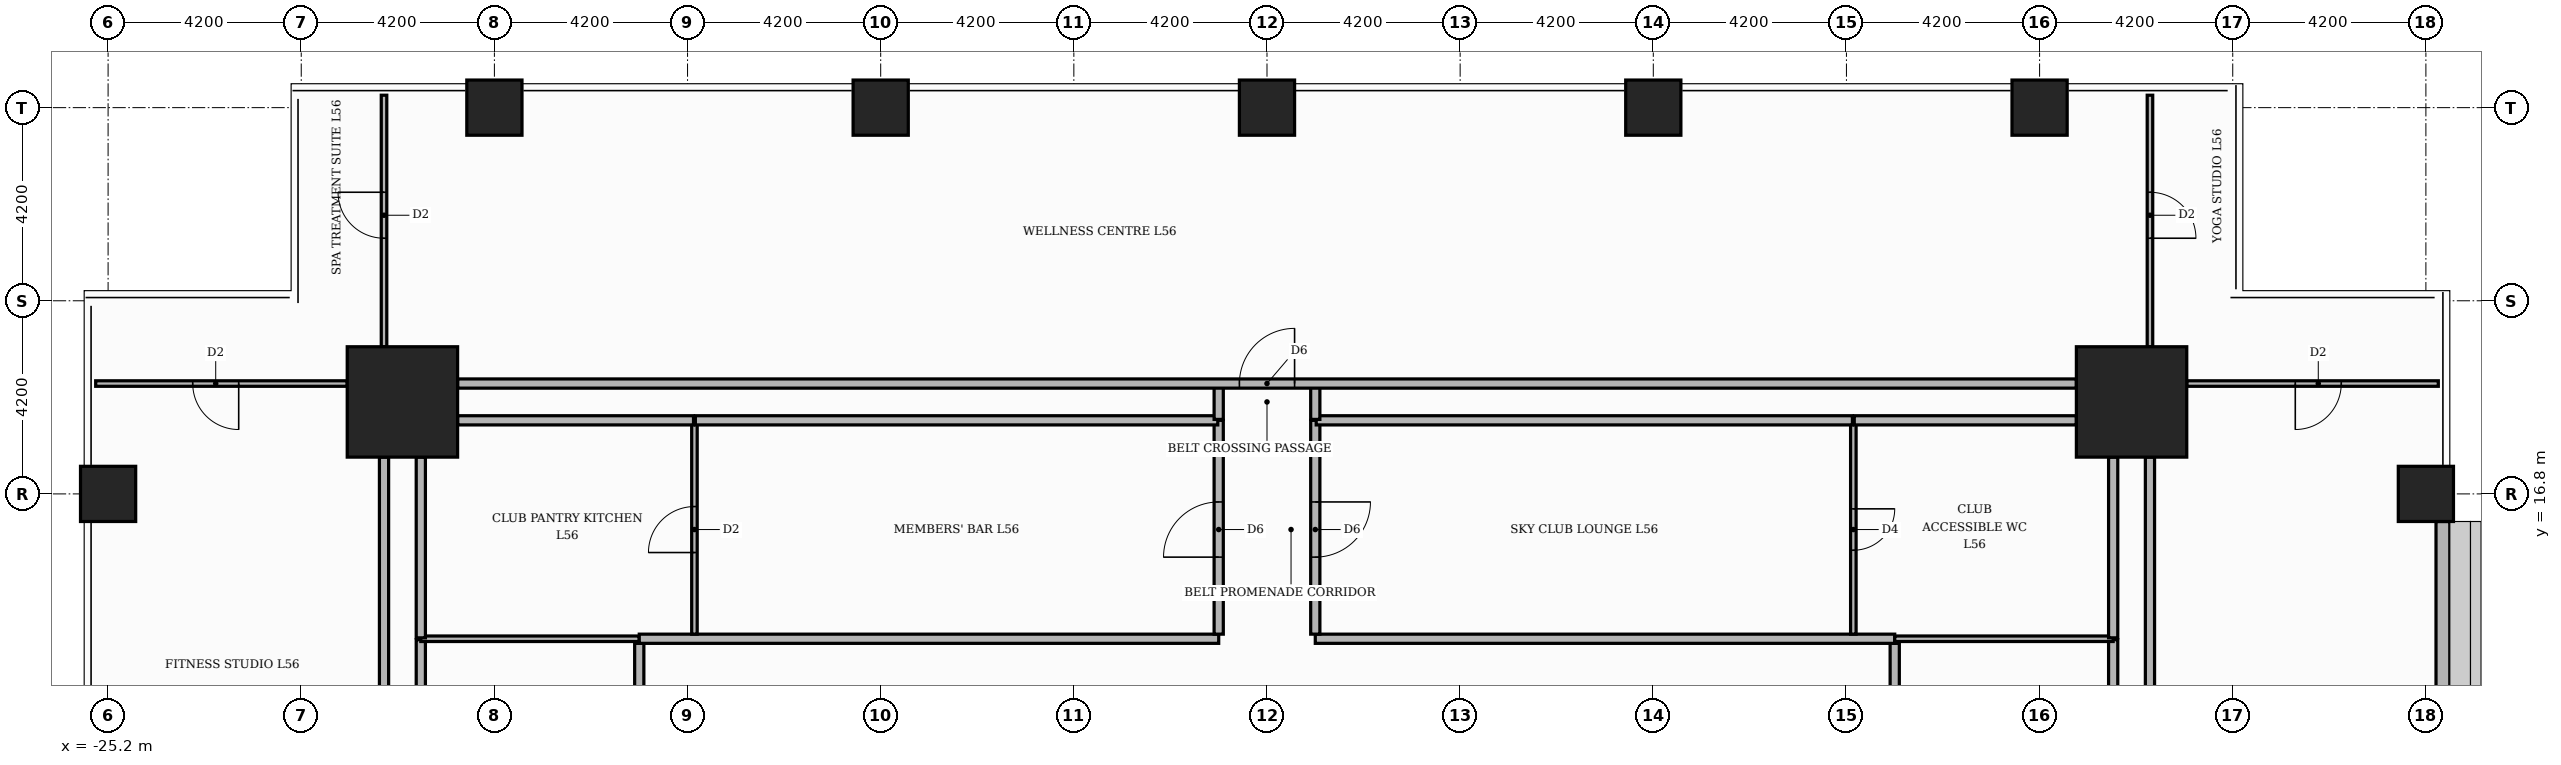
"""IFC4 building model, lengths in metres.
Left out: names, types, materials, properties, quantities, classifications, styles, units other than length and angle.
Written with IfcOpenShell. Run it as: python <this file> out.ifc"""

import sys

from ifc_helpers import new_model, si_unit, direction, frame, frame_2d, origin, origin_2d, place, context, subcontext, project, spatial, rectangle, extrude, element, fill, save


model = new_model("IFC4")
c1 = context("Model", 3, precision=1e-05, world=origin(), true_north=direction((0.0, 1.0)))
c2 = subcontext(c1, "Body", "Model", "MODEL_VIEW")
j1 = project(units=[si_unit("LENGTHUNIT", "METRE"), si_unit("PLANEANGLEUNIT", "RADIAN")], contexts=[c1])
p1 = place(None, origin())
s1 = spatial("IfcSite", under=j1, at=p1, CompositionType="ELEMENT")
p2 = place(p1, origin())
s2 = spatial("IfcBuilding", under=s1, at=p2, CompositionType="ELEMENT")
p3 = place(p2, frame((0.0, 0.0, 235.2)))
s3 = spatial("IfcBuildingStorey", under=s2, at=p3, CompositionType="ELEMENT", Elevation=235.2)
for number, where, z_axis, x_axis in (
    (1, (18.8, 18.8, 0.0), (0.0, 0.0, 1.0), (1.0, 0.0, 0.0)),
    (2, (-18.8, 18.8, 0.0), (0.0, 0.0, 1.0), (1.0, 0.0, 0.0)),
):
    element("IfcColumn", number, at=place(p3, frame(where, z_axis=z_axis, x_axis=x_axis)), inside=s3, PredefinedType="COLUMN", context=c2, shape_type="SweptSolid", body=[
        extrude(rectangle(XDim=2.4, YDim=2.4, at=origin_2d()), origin(), (0.0, 0.0, 1.0), 5.4),
    ])
for number, where, z_axis, x_axis in (
    (3, (25.2, 16.8, 0.0), (0.0, 0.0, 1.0), (1.0, 0.0, 0.0)),
    (4, (0.0, 25.2, 0.0), (0.0, 0.0, 1.0), (1.0, 0.0, 0.0)),
    (5, (-8.4, 25.2, 0.0), (0.0, 0.0, 1.0), (1.0, 0.0, 0.0)),
    (6, (-16.8, 25.2, 0.0), (0.0, 0.0, 1.0), (1.0, 0.0, 0.0)),
    (7, (8.4, 25.2, 0.0), (0.0, 0.0, 1.0), (1.0, 0.0, 0.0)),
    (8, (16.8, 25.2, 0.0), (0.0, 0.0, 1.0), (1.0, 0.0, 0.0)),
    (9, (-25.2, 16.8, 0.0), (0.0, 0.0, 1.0), (1.0, 0.0, 0.0)),
):
    element("IfcColumn", number, at=place(p3, frame(where, z_axis=z_axis, x_axis=x_axis)), inside=s3, PredefinedType="COLUMN", context=c2, shape_type="SweptSolid", body=[
        extrude(rectangle(XDim=1.2, YDim=1.2, at=origin_2d()), origin(), (0.0, 0.0, 1.0), 5.4),
    ])
p4 = place(p3, frame((25.57, -16.2, 0.0), z_axis=(0.0, 0.0, 1.0), x_axis=(0.0, 1.0, 0.0)))
e10 = element("IfcWall", 10, at=p4, inside=s3, PredefinedType="STANDARD", context=c2, shape_type="SweptSolid", body=[
    extrude(rectangle(XDim=32.4, YDim=0.3, at=frame_2d((16.2, 0.0))), origin(), (0.0, 0.0, 1.0), 4.98),
])
p5 = place(p3, frame((-19.2, -17.6, 0.0), z_axis=(0.0, 0.0, 1.0), x_axis=(0.0, 1.0, 0.0)))
e11 = element("IfcWall", 11, at=p5, inside=s3, PredefinedType="PARTITIONING", context=c2, shape_type="SweptSolid", body=[
    extrude(rectangle(XDim=35.2, YDim=0.2, at=frame_2d((17.6, 0.0))), origin(), (0.0, 0.0, 1.0), 4.98),
])
p6 = place(p3, frame((18.4, -17.6, 0.0), z_axis=(0.0, 0.0, 1.0), x_axis=(0.0, 1.0, 0.0)))
e12 = element("IfcWall", 12, at=p6, inside=s3, PredefinedType="PARTITIONING", context=c2, shape_type="SweptSolid", body=[
    extrude(rectangle(XDim=31.23, YDim=0.2, at=frame_2d((15.615, 0.0))), origin(), (0.0, 0.0, 1.0), 4.98),
])
p7 = place(p3, frame((-13.65, -13.55, 0.0), z_axis=(0.0, 0.0, 1.0), x_axis=(0.0, 1.0, 0.0)))
e13 = element("IfcWall", 13, at=p7, inside=s3, PredefinedType="PARTITIONING", context=c2, shape_type="SweptSolid", body=[
    extrude(rectangle(XDim=27.1, YDim=0.2, at=frame_2d((13.55, 0.0))), origin(), (0.0, 0.0, 1.0), 4.98),
])
p8 = place(p7, frame((20.375, 0.0, 0.0)))
e14 = element("IfcOpeningElement", 14, at=p8, cuts=e13, PredefinedType="OPENING", context=c2, shape_type="SweptSolid", body=[
    extrude(rectangle(XDim=1.2, YDim=2.1, at=frame_2d((0.6, 1.05))), frame((0.0, 0.11, 0.0), z_axis=(0.0, -1.0, 0.0), x_axis=(1.0, 0.0, 0.0)), (0.0, 0.0, 1.0), 0.22),
])
p9 = place(p3, frame((13.65, -13.55, 0.0), z_axis=(0.0, 0.0, 1.0), x_axis=(0.0, 1.0, 0.0)))
e15 = element("IfcWall", 15, at=p9, inside=s3, PredefinedType="PARTITIONING", context=c2, shape_type="SweptSolid", body=[
    extrude(rectangle(XDim=27.1, YDim=0.2, at=frame_2d((13.55, 0.0))), origin(), (0.0, 0.0, 1.0), 4.98),
])
p10 = place(p3, frame((-18.4, 1.22, 0.0), z_axis=(0.0, 0.0, 1.0), x_axis=(0.0, 1.0, 0.0)))
e16 = element("IfcWall", 16, at=p10, inside=s3, PredefinedType="PARTITIONING", context=c2, shape_type="SweptSolid", body=[
    extrude(rectangle(XDim=12.41, YDim=0.2, at=frame_2d((6.205, 0.0))), origin(), (0.0, 0.0, 1.0), 4.98),
])
p11 = place(p3, frame((19.2, 4.22, 0.0), z_axis=(0.0, 0.0, 1.0), x_axis=(0.0, 1.0, 0.0)))
e17 = element("IfcWall", 17, at=p11, inside=s3, PredefinedType="PARTITIONING", context=c2, shape_type="SweptSolid", body=[
    extrude(rectangle(XDim=13.38, YDim=0.2, at=frame_2d((6.69, 0.0))), origin(), (0.0, 0.0, 1.0), 4.98),
])
p12 = place(p3, frame((-18.4, 13.65, 0.0), z_axis=(0.0, 0.0, 1.0), x_axis=(1.0, 0.0, 0.0)))
e18 = element("IfcWall", 18, at=p12, inside=s3, PredefinedType="PARTITIONING", context=c2, shape_type="SweptSolid", body=[
    extrude(rectangle(XDim=4.75, YDim=0.12, at=frame_2d((2.375, 0.0))), origin(), (0.0, 0.0, 1.0), 4.98),
])
for number, where, z_axis, x_axis in (
    (19, (-13.65, 13.65, 0.0), (0.0, 0.0, 1.0), (1.0, 0.0, 0.0)),
    (20, (1.05, 13.65, 0.0), (0.0, 0.0, 1.0), (1.0, 0.0, 0.0)),
):
    element("IfcWall", number, at=place(p3, frame(where, z_axis=z_axis, x_axis=x_axis)), inside=s3, PredefinedType="PARTITIONING", context=c2, shape_type="SweptSolid", body=[
        extrude(rectangle(XDim=12.6, YDim=0.2, at=frame_2d((6.3, 0.0))), origin(), (0.0, 0.0, 1.0), 4.98),
    ])
p13 = place(p3, frame((13.65, 13.65, 0.0), z_axis=(0.0, 0.0, 1.0), x_axis=(1.0, 0.0, 0.0)))
e21 = element("IfcWall", 21, at=p13, inside=s3, PredefinedType="PARTITIONING", context=c2, shape_type="SweptSolid", body=[
    extrude(rectangle(XDim=4.75, YDim=0.12, at=frame_2d((2.375, 0.0))), origin(), (0.0, 0.0, 1.0), 4.98),
])
for number, where, z_axis, x_axis in (
    (22, (-18.4, 13.67, 0.0), (0.0, 0.0, 1.0), (0.0, 1.0, 0.0)),
    (23, (18.4, 13.67, 0.0), (0.0, 0.0, 1.0), (0.0, 1.0, 0.0)),
):
    element("IfcWall", number, at=place(p3, frame(where, z_axis=z_axis, x_axis=x_axis)), inside=s3, PredefinedType="PARTITIONING", context=c2, shape_type="SweptSolid", body=[
        extrude(rectangle(XDim=3.93, YDim=0.2, at=frame_2d((1.965, 0.0))), origin(), (0.0, 0.0, 1.0), 4.98),
    ])
p14 = place(p3, frame((-12.45, 13.75, 0.0), z_axis=(0.0, 0.0, 1.0), x_axis=(0.0, 1.0, 0.0)))
e24 = element("IfcWall", 24, at=p14, inside=s3, PredefinedType="PARTITIONING", context=c2, shape_type="SweptSolid", body=[
    extrude(rectangle(XDim=4.65, YDim=0.12, at=frame_2d((2.325, 0.0))), origin(), (0.0, 0.0, 1.0), 4.98),
])
p15 = place(p14, frame((1.775, 0.0, 0.0)))
e25 = element("IfcOpeningElement", 25, at=p15, cuts=e24, PredefinedType="OPENING", context=c2, shape_type="SweptSolid", body=[
    extrude(rectangle(XDim=1.0, YDim=2.1, at=frame_2d((0.5, 1.05))), frame((0.0, 0.07, 0.0), z_axis=(0.0, -1.0, 0.0), x_axis=(1.0, 0.0, 0.0)), (0.0, 0.0, 1.0), 0.14),
])
p16 = place(p3, frame((-1.05, 13.75, 0.0), z_axis=(0.0, 0.0, 1.0), x_axis=(0.0, 1.0, 0.0)))
e26 = element("IfcWall", 26, at=p16, inside=s3, PredefinedType="PARTITIONING", context=c2, shape_type="SweptSolid", body=[
    extrude(rectangle(XDim=4.65, YDim=0.2, at=frame_2d((2.325, 0.0))), origin(), (0.0, 0.0, 1.0), 4.98),
])
p17 = place(p16, frame((1.675, 0.0, 0.0)))
e27 = element("IfcOpeningElement", 27, at=p17, cuts=e26, PredefinedType="OPENING", context=c2, shape_type="SweptSolid", body=[
    extrude(rectangle(XDim=1.2, YDim=2.1, at=frame_2d((0.6, 1.05))), frame((0.0, 0.11, 0.0), z_axis=(0.0, -1.0, 0.0), x_axis=(1.0, 0.0, 0.0)), (0.0, 0.0, 1.0), 0.22),
])
p18 = place(p3, frame((1.05, 13.75, 0.0), z_axis=(0.0, 0.0, 1.0), x_axis=(0.0, 1.0, 0.0)))
e28 = element("IfcWall", 28, at=p18, inside=s3, PredefinedType="PARTITIONING", context=c2, shape_type="SweptSolid", body=[
    extrude(rectangle(XDim=4.65, YDim=0.2, at=frame_2d((2.325, 0.0))), origin(), (0.0, 0.0, 1.0), 4.98),
])
p19 = place(p18, frame((1.675, 0.0, 0.0)))
e29 = element("IfcOpeningElement", 29, at=p19, cuts=e28, PredefinedType="OPENING", context=c2, shape_type="SweptSolid", body=[
    extrude(rectangle(XDim=1.2, YDim=2.1, at=frame_2d((0.6, 1.05))), frame((0.0, 0.11, 0.0), z_axis=(0.0, -1.0, 0.0), x_axis=(1.0, 0.0, 0.0)), (0.0, 0.0, 1.0), 0.22),
])
p20 = place(p3, frame((12.75, 13.75, 0.0), z_axis=(0.0, 0.0, 1.0), x_axis=(0.0, 1.0, 0.0)))
e30 = element("IfcWall", 30, at=p20, inside=s3, PredefinedType="PARTITIONING", context=c2, shape_type="SweptSolid", body=[
    extrude(rectangle(XDim=4.65, YDim=0.12, at=frame_2d((2.325, 0.0))), origin(), (0.0, 0.0, 1.0), 4.98),
])
p21 = place(p20, frame((1.825, 0.0, 0.0)))
e31 = element("IfcOpeningElement", 31, at=p21, cuts=e30, PredefinedType="OPENING", context=c2, shape_type="SweptSolid", body=[
    extrude(rectangle(XDim=0.9, YDim=2.1, at=frame_2d((0.45, 1.05))), frame((0.0, 0.07, 0.0), z_axis=(0.0, -1.0, 0.0), x_axis=(1.0, 0.0, 0.0)), (0.0, 0.0, 1.0), 0.14),
])
p22 = place(p3, frame((-17.6, 18.4, 0.0), z_axis=(0.0, 0.0, 1.0), x_axis=(1.0, 0.0, 0.0)))
e32 = element("IfcWall", 32, at=p22, inside=s3, PredefinedType="PARTITIONING", context=c2, shape_type="SweptSolid", body=[
    extrude(rectangle(XDim=5.13, YDim=0.2, at=frame_2d((2.565, 0.0))), origin(), (0.0, 0.0, 1.0), 4.98),
])
p23 = place(p3, frame((-12.43, 18.4, 0.0), z_axis=(0.0, 0.0, 1.0), x_axis=(1.0, 0.0, 0.0)))
e33 = element("IfcWall", 33, at=p23, inside=s3, PredefinedType="PARTITIONING", context=c2, shape_type="SweptSolid", body=[
    extrude(rectangle(XDim=11.36, YDim=0.2, at=frame_2d((5.68, 0.0))), origin(), (0.0, 0.0, 1.0), 4.98),
])
p24 = place(p3, frame((1.07, 18.4, 0.0), z_axis=(0.0, 0.0, 1.0), x_axis=(1.0, 0.0, 0.0)))
e34 = element("IfcWall", 34, at=p24, inside=s3, PredefinedType="PARTITIONING", context=c2, shape_type="SweptSolid", body=[
    extrude(rectangle(XDim=11.66, YDim=0.2, at=frame_2d((5.83, 0.0))), origin(), (0.0, 0.0, 1.0), 4.98),
])
p25 = place(p3, frame((12.77, 18.4, 0.0), z_axis=(0.0, 0.0, 1.0), x_axis=(1.0, 0.0, 0.0)))
e35 = element("IfcWall", 35, at=p25, inside=s3, PredefinedType="PARTITIONING", context=c2, shape_type="SweptSolid", body=[
    extrude(rectangle(XDim=4.83, YDim=0.2, at=frame_2d((2.415, 0.0))), origin(), (0.0, 0.0, 1.0), 4.98),
])
for number, where, z_axis, x_axis in (
    (36, (-1.05, 18.42, 0.0), (0.0, 0.0, 1.0), (0.0, 1.0, 0.0)),
    (37, (1.05, 18.42, 0.0), (0.0, 0.0, 1.0), (0.0, 1.0, 0.0)),
):
    element("IfcWall", number, at=place(p3, frame(where, z_axis=z_axis, x_axis=x_axis)), inside=s3, PredefinedType="PARTITIONING", context=c2, shape_type="SweptSolid", body=[
        extrude(rectangle(XDim=0.76, YDim=0.2, at=frame_2d((0.38, 0.0))), origin(), (0.0, 0.0, 1.0), 4.98),
    ])
p26 = place(p3, frame((-25.47, 19.2, 0.0), z_axis=(0.0, 0.0, 1.0), x_axis=(1.0, 0.0, 0.0)))
e38 = element("IfcWall", 38, at=p26, inside=s3, PredefinedType="PARTITIONING", context=c2, shape_type="SweptSolid", body=[
    extrude(rectangle(XDim=5.47, YDim=0.12, at=frame_2d((2.735, 0.0))), origin(), (0.0, 0.0, 1.0), 4.98),
])
p27 = place(p26, frame((2.11, 0.0, 0.0)))
e39 = element("IfcOpeningElement", 39, at=p27, cuts=e38, PredefinedType="OPENING", context=c2, shape_type="SweptSolid", body=[
    extrude(rectangle(XDim=1.0, YDim=2.1, at=frame_2d((0.5, 1.05))), frame((0.0, 0.07, 0.0), z_axis=(0.0, -1.0, 0.0), x_axis=(1.0, 0.0, 0.0)), (0.0, 0.0, 1.0), 0.14),
])
p28 = place(p3, frame((-17.6, 19.2, 0.0), z_axis=(0.0, 0.0, 1.0), x_axis=(1.0, 0.0, 0.0)))
e40 = element("IfcWall", 40, at=p28, inside=s3, PredefinedType="PARTITIONING", context=c2, shape_type="SweptSolid", body=[
    extrude(rectangle(XDim=35.2, YDim=0.2, at=frame_2d((17.6, 0.0))), origin(), (0.0, 0.0, 1.0), 4.98),
])
p29 = place(p28, frame((17.0, 0.0, 0.0)))
e41 = element("IfcOpeningElement", 41, at=p29, cuts=e40, PredefinedType="OPENING", context=c2, shape_type="SweptSolid", body=[
    extrude(rectangle(XDim=1.2, YDim=2.1, at=frame_2d((0.6, 1.05))), frame((0.0, 0.11, 0.0), z_axis=(0.0, -1.0, 0.0), x_axis=(1.0, 0.0, 0.0)), (0.0, 0.0, 1.0), 0.22),
])
p30 = place(p3, frame((20.0, 19.2, 0.0), z_axis=(0.0, 0.0, 1.0), x_axis=(1.0, 0.0, 0.0)))
e42 = element("IfcWall", 42, at=p30, inside=s3, PredefinedType="PARTITIONING", context=c2, shape_type="SweptSolid", body=[
    extrude(rectangle(XDim=5.47, YDim=0.12, at=frame_2d((2.735, 0.0))), origin(), (0.0, 0.0, 1.0), 4.98),
])
p31 = place(p30, frame((2.36, 0.0, 0.0)))
e43 = element("IfcOpeningElement", 43, at=p31, cuts=e42, PredefinedType="OPENING", context=c2, shape_type="SweptSolid", body=[
    extrude(rectangle(XDim=1.0, YDim=2.1, at=frame_2d((0.5, 1.05))), frame((0.0, 0.07, 0.0), z_axis=(0.0, -1.0, 0.0), x_axis=(1.0, 0.0, 0.0)), (0.0, 0.0, 1.0), 0.14),
])
p32 = place(p3, frame((-19.2, 20.0, 0.0), z_axis=(0.0, 0.0, 1.0), x_axis=(0.0, 1.0, 0.0)))
e44 = element("IfcWall", 44, at=p32, inside=s3, PredefinedType="PARTITIONING", context=c2, shape_type="SweptSolid", body=[
    extrude(rectangle(XDim=5.47, YDim=0.12, at=frame_2d((2.735, 0.0))), origin(), (0.0, 0.0, 1.0), 4.98),
])
p33 = place(p32, frame((2.36, 0.0, 0.0)))
e45 = element("IfcOpeningElement", 45, at=p33, cuts=e44, PredefinedType="OPENING", context=c2, shape_type="SweptSolid", body=[
    extrude(rectangle(XDim=1.0, YDim=2.1, at=frame_2d((0.5, 1.05))), frame((0.0, 0.07, 0.0), z_axis=(0.0, -1.0, 0.0), x_axis=(1.0, 0.0, 0.0)), (0.0, 0.0, 1.0), 0.14),
])
p34 = place(p3, frame((19.2, 20.0, 0.0), z_axis=(0.0, 0.0, 1.0), x_axis=(0.0, 1.0, 0.0)))
e46 = element("IfcWall", 46, at=p34, inside=s3, PredefinedType="PARTITIONING", context=c2, shape_type="SweptSolid", body=[
    extrude(rectangle(XDim=5.47, YDim=0.12, at=frame_2d((2.735, 0.0))), origin(), (0.0, 0.0, 1.0), 4.98),
])
p35 = place(p34, frame((2.36, 0.0, 0.0)))
e47 = element("IfcOpeningElement", 47, at=p35, cuts=e46, PredefinedType="OPENING", context=c2, shape_type="SweptSolid", body=[
    extrude(rectangle(XDim=1.0, YDim=2.1, at=frame_2d((0.5, 1.05))), frame((0.0, 0.07, 0.0), z_axis=(0.0, -1.0, 0.0), x_axis=(1.0, 0.0, 0.0)), (0.0, 0.0, 1.0), 0.14),
])
p36 = place(p19, frame((1.2, 0.0, 0.0), z_axis=(0.0, 0.0, 1.0), x_axis=(-1.0, 0.0, 0.0)))
e48 = element("IfcDoor", 48, at=p36, inside=s3, OperationType="SINGLE_SWING_RIGHT", PredefinedType="DOOR", context=c2, shape_type="SweptSolid", body=[
    extrude(rectangle(XDim=1.2, YDim=2.1, at=frame_2d((0.6, 1.05))), frame((0.0, 0.025, 0.0), z_axis=(0.0, -1.0, 0.0), x_axis=(1.0, 0.0, 0.0)), (0.0, 0.0, 1.0), 0.05),
])
fill(e29, e48)
p37 = place(p17, origin())
e49 = element("IfcDoor", 49, at=p37, inside=s3, OperationType="SINGLE_SWING_LEFT", PredefinedType="DOOR", context=c2, shape_type="SweptSolid", body=[
    extrude(rectangle(XDim=1.2, YDim=2.1, at=frame_2d((0.6, 1.05))), frame((0.0, 0.025, 0.0), z_axis=(0.0, -1.0, 0.0), x_axis=(1.0, 0.0, 0.0)), (0.0, 0.0, 1.0), 0.05),
])
fill(e27, e49)
p38 = place(p15, origin())
e50 = element("IfcDoor", 50, at=p38, inside=s3, OperationType="SINGLE_SWING_LEFT", PredefinedType="DOOR", context=c2, shape_type="SweptSolid", body=[
    extrude(rectangle(XDim=1.0, YDim=2.1, at=frame_2d((0.5, 1.05))), frame((0.0, 0.025, 0.0), z_axis=(0.0, -1.0, 0.0), x_axis=(1.0, 0.0, 0.0)), (0.0, 0.0, 1.0), 0.05),
])
fill(e25, e50)
p39 = place(p21, frame((0.9, 0.0, 0.0), z_axis=(0.0, 0.0, 1.0), x_axis=(-1.0, 0.0, 0.0)))
e51 = element("IfcDoor", 51, at=p39, inside=s3, OperationType="SINGLE_SWING_RIGHT", PredefinedType="DOOR", context=c2, shape_type="SweptSolid", body=[
    extrude(rectangle(XDim=0.9, YDim=2.1, at=frame_2d((0.45, 1.05))), frame((0.0, 0.025, 0.0), z_axis=(0.0, -1.0, 0.0), x_axis=(1.0, 0.0, 0.0)), (0.0, 0.0, 1.0), 0.05),
])
fill(e31, e51)
p40 = place(p29, origin())
e52 = element("IfcDoor", 52, at=p40, inside=s3, OperationType="SINGLE_SWING_RIGHT", PredefinedType="DOOR", context=c2, shape_type="SweptSolid", body=[
    extrude(rectangle(XDim=1.2, YDim=2.1, at=frame_2d((0.6, 1.05))), frame((0.0, 0.025, 0.0), z_axis=(0.0, -1.0, 0.0), x_axis=(1.0, 0.0, 0.0)), (0.0, 0.0, 1.0), 0.05),
])
fill(e41, e52)
p41 = place(p33, origin())
e53 = element("IfcDoor", 53, at=p41, inside=s3, OperationType="SINGLE_SWING_RIGHT", PredefinedType="DOOR", context=c2, shape_type="SweptSolid", body=[
    extrude(rectangle(XDim=1.0, YDim=2.1, at=frame_2d((0.5, 1.05))), frame((0.0, 0.025, 0.0), z_axis=(0.0, -1.0, 0.0), x_axis=(1.0, 0.0, 0.0)), (0.0, 0.0, 1.0), 0.05),
])
fill(e45, e53)
p42 = place(p35, frame((1.0, 0.0, 0.0), z_axis=(0.0, 0.0, 1.0), x_axis=(-1.0, 0.0, 0.0)))
e54 = element("IfcDoor", 54, at=p42, inside=s3, OperationType="SINGLE_SWING_LEFT", PredefinedType="DOOR", context=c2, shape_type="SweptSolid", body=[
    extrude(rectangle(XDim=1.0, YDim=2.1, at=frame_2d((0.5, 1.05))), frame((0.0, 0.025, 0.0), z_axis=(0.0, -1.0, 0.0), x_axis=(1.0, 0.0, 0.0)), (0.0, 0.0, 1.0), 0.05),
])
fill(e47, e54)
p43 = place(p27, frame((1.0, 0.0, 0.0), z_axis=(0.0, 0.0, 1.0), x_axis=(-1.0, 0.0, 0.0)))
e55 = element("IfcDoor", 55, at=p43, inside=s3, OperationType="SINGLE_SWING_RIGHT", PredefinedType="DOOR", context=c2, shape_type="SweptSolid", body=[
    extrude(rectangle(XDim=1.0, YDim=2.1, at=frame_2d((0.5, 1.05))), frame((0.0, 0.025, 0.0), z_axis=(0.0, -1.0, 0.0), x_axis=(1.0, 0.0, 0.0)), (0.0, 0.0, 1.0), 0.05),
])
fill(e39, e55)
p44 = place(p31, frame((1.0, 0.0, 0.0), z_axis=(0.0, 0.0, 1.0), x_axis=(-1.0, 0.0, 0.0)))
e56 = element("IfcDoor", 56, at=p44, inside=s3, OperationType="SINGLE_SWING_LEFT", PredefinedType="DOOR", context=c2, shape_type="SweptSolid", body=[
    extrude(rectangle(XDim=1.0, YDim=2.1, at=frame_2d((0.5, 1.05))), frame((0.0, 0.025, 0.0), z_axis=(0.0, -1.0, 0.0), x_axis=(1.0, 0.0, 0.0)), (0.0, 0.0, 1.0), 0.05),
])
fill(e43, e56)
save(model, sys.argv[1])
